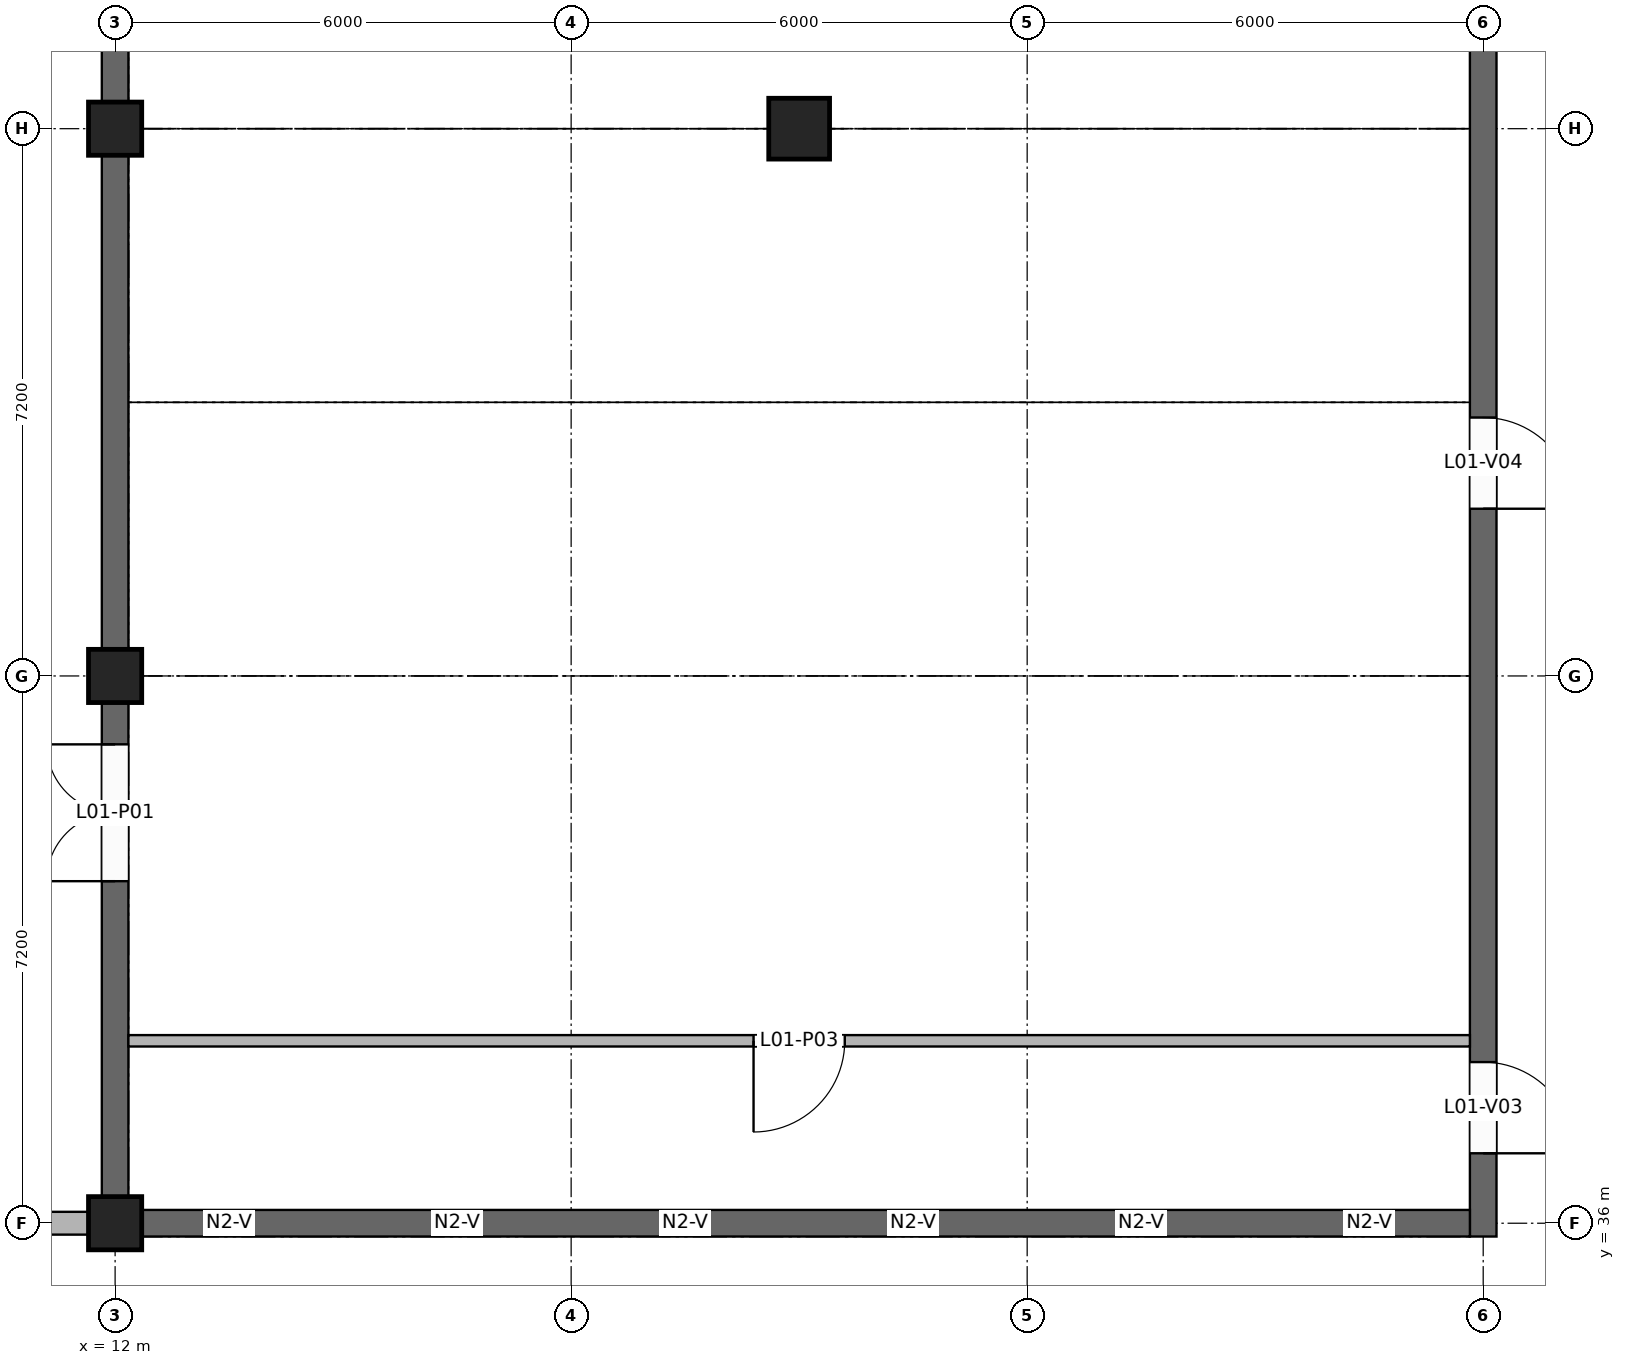
"""IFC4 building model, lengths in metres.
Left out: names, types, materials, properties, quantities, classifications, styles, units other than length and angle.
Written with IfcOpenShell. Run it as: python <this file> out.ifc"""

import sys

from ifc_helpers import new_model, si_unit, direction, frame, frame_2d, origin, origin_2d, place, context, subcontext, project, spatial, rectangle, extrude, element, fill, save


model = new_model("IFC4")
c1 = context("Model", 3, precision=1e-05, world=origin(), true_north=direction((0.0, 1.0)))
c2 = subcontext(c1, "Body", "Model", "MODEL_VIEW")
j1 = project(units=[si_unit("LENGTHUNIT", "METRE"), si_unit("PLANEANGLEUNIT", "RADIAN")], contexts=[c1])
p1 = place(None, origin())
s1 = spatial("IfcSite", under=j1, at=p1, CompositionType="ELEMENT")
p2 = place(p1, origin())
s2 = spatial("IfcBuilding", under=s1, at=p2, CompositionType="ELEMENT")
p3 = place(p2, frame((0.0, 0.0, 4.2)))
s3 = spatial("IfcBuildingStorey", under=s2, at=p3, CompositionType="ELEMENT", Elevation=4.2)
for number, where, z_axis, x_axis in (
    (1, (12.0, 36.0, 0.0), (0.0, 0.0, 1.0), (1.0, 0.0, 0.0)),
    (2, (12.0, 43.2, 0.0), (0.0, 0.0, 1.0), (1.0, 0.0, 0.0)),
    (3, (12.0, 50.4, 0.0), (0.0, 0.0, 1.0), (1.0, 0.0, 0.0)),
):
    element("IfcColumn", number, at=place(p3, frame(where, z_axis=z_axis, x_axis=x_axis)), inside=s3, PredefinedType="COLUMN", context=c2, shape_type="SweptSolid", body=[
        extrude(rectangle(XDim=0.7, YDim=0.7, at=origin_2d()), origin(), (0.0, 0.0, 1.0), 3.95),
    ])
p4 = place(p3, frame((30.0, 35.825, 0.0), z_axis=(0.0, 0.0, 1.0), x_axis=(0.0, 1.0, 0.0)))
e4 = element("IfcWall", 4, at=p4, inside=s3, PredefinedType="SHEAR", context=c2, shape_type="SweptSolid", body=[
    extrude(rectangle(XDim=21.55, YDim=0.35, at=frame_2d((10.775, 0.0))), origin(), (0.0, 0.0, 1.0), 4.2),
])
p5 = place(p4, frame((1.095, 0.0, 0.0)))
e5 = element("IfcOpeningElement", 5, at=p5, cuts=e4, PredefinedType="OPENING", context=c2, shape_type="SweptSolid", body=[
    extrude(rectangle(XDim=1.2, YDim=2.4, at=frame_2d((0.6, 1.2))), frame((0.0, 0.185, 0.0), z_axis=(0.0, -1.0, 0.0), x_axis=(1.0, 0.0, 0.0)), (0.0, 0.0, 1.0), 0.37),
])
p6 = place(p4, frame((9.575, 0.0, 0.0)))
e6 = element("IfcOpeningElement", 6, at=p6, cuts=e4, PredefinedType="OPENING", context=c2, shape_type="SweptSolid", body=[
    extrude(rectangle(XDim=1.2, YDim=2.4, at=frame_2d((0.6, 1.2))), frame((0.0, 0.185, 0.0), z_axis=(0.0, -1.0, 0.0), x_axis=(1.0, 0.0, 0.0)), (0.0, 0.0, 1.0), 0.37),
])
p7 = place(p4, frame((17.095, 0.0, 0.0)))
e7 = element("IfcOpeningElement", 7, at=p7, cuts=e4, PredefinedType="OPENING", context=c2, shape_type="SweptSolid", body=[
    extrude(rectangle(XDim=1.2, YDim=2.4, at=frame_2d((0.6, 1.2))), frame((0.0, 0.185, 0.0), z_axis=(0.0, -1.0, 0.0), x_axis=(1.0, 0.0, 0.0)), (0.0, 0.0, 1.0), 0.37),
])
p8 = place(p3, frame((12.0, 36.35, 0.0), z_axis=(0.0, 0.0, 1.0), x_axis=(0.0, 1.0, 0.0)))
e8 = element("IfcWall", 8, at=p8, inside=s3, PredefinedType="SHEAR", context=c2, shape_type="SweptSolid", body=[
    extrude(rectangle(XDim=6.5, YDim=0.35, at=frame_2d((3.25, 0.0))), origin(), (0.0, 0.0, 1.0), 3.05),
])
p9 = place(p8, frame((4.15, 0.0, 0.0)))
e9 = element("IfcOpeningElement", 9, at=p9, cuts=e8, PredefinedType="OPENING", context=c2, shape_type="SweptSolid", body=[
    extrude(rectangle(XDim=1.8, YDim=2.1, at=frame_2d((0.9, 1.05))), frame((0.0, 0.185, 0.0), z_axis=(0.0, -1.0, 0.0), x_axis=(1.0, 0.0, 0.0)), (0.0, 0.0, 1.0), 0.37),
])
p10 = place(p3, frame((12.0, 43.55, 0.0), z_axis=(0.0, 0.0, 1.0), x_axis=(0.0, 1.0, 0.0)))
e10 = element("IfcWall", 10, at=p10, inside=s3, PredefinedType="SHEAR", context=c2, shape_type="SweptSolid", body=[
    extrude(rectangle(XDim=6.5, YDim=0.35, at=frame_2d((3.25, 0.0))), origin(), (0.0, 0.0, 1.0), 3.05),
])
p11 = place(p3, frame((12.0, 50.75, 0.0), z_axis=(0.0, 0.0, 1.0), x_axis=(0.0, 1.0, 0.0)))
e11 = element("IfcWall", 11, at=p11, inside=s3, PredefinedType="SHEAR", context=c2, shape_type="SweptSolid", body=[
    extrude(rectangle(XDim=6.625, YDim=0.35, at=frame_2d((3.312, 0.0))), origin(), (0.0, 0.0, 1.0), 3.05),
])
p12 = place(p11, frame((2.15, 0.0, 0.0)))
e12 = element("IfcOpeningElement", 12, at=p12, cuts=e11, PredefinedType="OPENING", context=c2, shape_type="SweptSolid", body=[
    extrude(rectangle(XDim=1.2, YDim=2.1, at=frame_2d((0.6, 1.05))), frame((0.0, 0.185, 0.0), z_axis=(0.0, -1.0, 0.0), x_axis=(1.0, 0.0, 0.0)), (0.0, 0.0, 1.0), 0.37),
])
p13 = place(p3, frame((12.35, 36.0, 0.0), z_axis=(0.0, 0.0, 1.0), x_axis=(1.0, 0.0, 0.0)))
e13 = element("IfcWall", 13, at=p13, inside=s3, PredefinedType="SHEAR", context=c2, shape_type="SweptSolid", body=[
    extrude(rectangle(XDim=17.475, YDim=0.35, at=frame_2d((8.737, 0.0))), origin(), (0.0, 0.0, 1.0), 4.2),
])
p14 = place(p13, frame((0.85, 0.0, 1.2)))
e14 = element("IfcOpeningElement", 14, at=p14, cuts=e13, PredefinedType="OPENING", context=c2, shape_type="SweptSolid", body=[
    extrude(rectangle(XDim=0.6, YDim=2.4, at=frame_2d((0.3, 1.2))), frame((0.0, 0.185, 0.0), z_axis=(0.0, -1.0, 0.0), x_axis=(1.0, 0.0, 0.0)), (0.0, 0.0, 1.0), 0.37),
])
p15 = place(p13, frame((3.85, 0.0, 1.2)))
e15 = element("IfcOpeningElement", 15, at=p15, cuts=e13, PredefinedType="OPENING", context=c2, shape_type="SweptSolid", body=[
    extrude(rectangle(XDim=0.6, YDim=2.4, at=frame_2d((0.3, 1.2))), frame((0.0, 0.185, 0.0), z_axis=(0.0, -1.0, 0.0), x_axis=(1.0, 0.0, 0.0)), (0.0, 0.0, 1.0), 0.37),
])
p16 = place(p13, frame((6.85, 0.0, 1.2)))
e16 = element("IfcOpeningElement", 16, at=p16, cuts=e13, PredefinedType="OPENING", context=c2, shape_type="SweptSolid", body=[
    extrude(rectangle(XDim=0.6, YDim=2.4, at=frame_2d((0.3, 1.2))), frame((0.0, 0.185, 0.0), z_axis=(0.0, -1.0, 0.0), x_axis=(1.0, 0.0, 0.0)), (0.0, 0.0, 1.0), 0.37),
])
p17 = place(p13, frame((9.85, 0.0, 1.2)))
e17 = element("IfcOpeningElement", 17, at=p17, cuts=e13, PredefinedType="OPENING", context=c2, shape_type="SweptSolid", body=[
    extrude(rectangle(XDim=0.6, YDim=2.4, at=frame_2d((0.3, 1.2))), frame((0.0, 0.185, 0.0), z_axis=(0.0, -1.0, 0.0), x_axis=(1.0, 0.0, 0.0)), (0.0, 0.0, 1.0), 0.37),
])
p18 = place(p13, frame((12.85, 0.0, 1.2)))
e18 = element("IfcOpeningElement", 18, at=p18, cuts=e13, PredefinedType="OPENING", context=c2, shape_type="SweptSolid", body=[
    extrude(rectangle(XDim=0.6, YDim=2.4, at=frame_2d((0.3, 1.2))), frame((0.0, 0.185, 0.0), z_axis=(0.0, -1.0, 0.0), x_axis=(1.0, 0.0, 0.0)), (0.0, 0.0, 1.0), 0.37),
])
p19 = place(p13, frame((15.85, 0.0, 1.2)))
e19 = element("IfcOpeningElement", 19, at=p19, cuts=e13, PredefinedType="OPENING", context=c2, shape_type="SweptSolid", body=[
    extrude(rectangle(XDim=0.6, YDim=2.4, at=frame_2d((0.3, 1.2))), frame((0.0, 0.185, 0.0), z_axis=(0.0, -1.0, 0.0), x_axis=(1.0, 0.0, 0.0)), (0.0, 0.0, 1.0), 0.37),
])
p20 = place(p3, frame((21.0, 50.4, -0.2), z_axis=(0.0, 0.0, 1.0), x_axis=(1.0, 0.0, 0.0)))
e20 = element("IfcColumn", 20, at=p20, inside=s3, PredefinedType="COLUMN", context=c2, shape_type="SweptSolid", body=[
    extrude(rectangle(XDim=0.8, YDim=0.8, at=origin_2d()), origin(), (0.0, 0.0, 1.0), 4.4),
])
p21 = place(p3, frame((6.0, 36.0, 0.0), z_axis=(0.0, 0.0, 1.0), x_axis=(1.0, 0.0, 0.0)))
e21 = element("IfcWall", 21, at=p21, inside=s3, PredefinedType="SOLIDWALL", context=c2, shape_type="SweptSolid", body=[
    extrude(rectangle(XDim=5.65, YDim=0.3, at=frame_2d((2.825, 0.0))), origin(), (0.0, 0.0, 1.0), 3.15),
])
p22 = place(p21, frame((0.512, 0.0, 0.9)))
e22 = element("IfcOpeningElement", 22, at=p22, cuts=e21, PredefinedType="OPENING", context=c2, shape_type="SweptSolid", body=[
    extrude(rectangle(XDim=1.2, YDim=1.5, at=frame_2d((0.6, 0.75))), frame((0.0, 0.16, 0.0), z_axis=(0.0, -1.0, 0.0), x_axis=(1.0, 0.0, 0.0)), (0.0, 0.0, 1.0), 0.32),
])
p23 = place(p21, frame((2.225, 0.0, 0.9)))
e23 = element("IfcOpeningElement", 23, at=p23, cuts=e21, PredefinedType="OPENING", context=c2, shape_type="SweptSolid", body=[
    extrude(rectangle(XDim=1.2, YDim=1.5, at=frame_2d((0.6, 0.75))), frame((0.0, 0.16, 0.0), z_axis=(0.0, -1.0, 0.0), x_axis=(1.0, 0.0, 0.0)), (0.0, 0.0, 1.0), 0.32),
])
p24 = place(p21, frame((3.938, 0.0, 0.9)))
e24 = element("IfcOpeningElement", 24, at=p24, cuts=e21, PredefinedType="OPENING", context=c2, shape_type="SweptSolid", body=[
    extrude(rectangle(XDim=1.2, YDim=1.5, at=frame_2d((0.6, 0.75))), frame((0.0, 0.16, 0.0), z_axis=(0.0, -1.0, 0.0), x_axis=(1.0, 0.0, 0.0)), (0.0, 0.0, 1.0), 0.32),
])
p25 = place(p3, frame((12.175, 38.4, 0.0), z_axis=(0.0, 0.0, 1.0), x_axis=(1.0, 0.0, 0.0)))
e25 = element("IfcWall", 25, at=p25, inside=s3, PredefinedType="PARTITIONING", context=c2, shape_type="SweptSolid", body=[
    extrude(rectangle(XDim=17.65, YDim=0.15, at=frame_2d((8.825, 0.0))), origin(), (0.0, 0.0, 1.0), 3.05),
])
p26 = place(p25, frame((8.225, 0.0, 0.0)))
e26 = element("IfcOpeningElement", 26, at=p26, cuts=e25, PredefinedType="OPENING", context=c2, shape_type="SweptSolid", body=[
    extrude(rectangle(XDim=1.2, YDim=2.1, at=frame_2d((0.6, 1.05))), frame((0.0, 0.085, 0.0), z_axis=(0.0, -1.0, 0.0), x_axis=(1.0, 0.0, 0.0)), (0.0, 0.0, 1.0), 0.17),
])
p27 = place(p5, frame((1.2, 0.0, 0.0), z_axis=(0.0, 0.0, 1.0), x_axis=(-1.0, 0.0, 0.0)))
e27 = element("IfcDoor", 27, at=p27, inside=s3, OperationType="SINGLE_SWING_RIGHT", PredefinedType="DOOR", context=c2, shape_type="SweptSolid", body=[
    extrude(rectangle(XDim=1.2, YDim=2.4, at=frame_2d((0.6, 1.2))), frame((0.0, 0.025, 0.0), z_axis=(0.0, -1.0, 0.0), x_axis=(1.0, 0.0, 0.0)), (0.0, 0.0, 1.0), 0.05),
])
fill(e5, e27)
p28 = place(p6, frame((1.2, 0.0, 0.0), z_axis=(0.0, 0.0, 1.0), x_axis=(-1.0, 0.0, 0.0)))
e28 = element("IfcDoor", 28, at=p28, inside=s3, OperationType="SINGLE_SWING_RIGHT", PredefinedType="DOOR", context=c2, shape_type="SweptSolid", body=[
    extrude(rectangle(XDim=1.2, YDim=2.4, at=frame_2d((0.6, 1.2))), frame((0.0, 0.025, 0.0), z_axis=(0.0, -1.0, 0.0), x_axis=(1.0, 0.0, 0.0)), (0.0, 0.0, 1.0), 0.05),
])
fill(e6, e28)
p29 = place(p14, origin())
e29 = element("IfcWindow", 29, at=p29, inside=s3, PartitioningType="SINGLE_PANEL", PredefinedType="WINDOW", context=c2, shape_type="SweptSolid", body=[
    extrude(rectangle(XDim=0.6, YDim=2.4, at=frame_2d((0.3, 1.2))), frame((0.0, 0.03, 0.0), z_axis=(0.0, -1.0, 0.0), x_axis=(1.0, 0.0, 0.0)), (0.0, 0.0, 1.0), 0.06),
])
fill(e14, e29)
p30 = place(p15, origin())
e30 = element("IfcWindow", 30, at=p30, inside=s3, PartitioningType="SINGLE_PANEL", PredefinedType="WINDOW", context=c2, shape_type="SweptSolid", body=[
    extrude(rectangle(XDim=0.6, YDim=2.4, at=frame_2d((0.3, 1.2))), frame((0.0, 0.03, 0.0), z_axis=(0.0, -1.0, 0.0), x_axis=(1.0, 0.0, 0.0)), (0.0, 0.0, 1.0), 0.06),
])
fill(e15, e30)
p31 = place(p16, origin())
e31 = element("IfcWindow", 31, at=p31, inside=s3, PartitioningType="SINGLE_PANEL", PredefinedType="WINDOW", context=c2, shape_type="SweptSolid", body=[
    extrude(rectangle(XDim=0.6, YDim=2.4, at=frame_2d((0.3, 1.2))), frame((0.0, 0.03, 0.0), z_axis=(0.0, -1.0, 0.0), x_axis=(1.0, 0.0, 0.0)), (0.0, 0.0, 1.0), 0.06),
])
fill(e16, e31)
p32 = place(p17, origin())
e32 = element("IfcWindow", 32, at=p32, inside=s3, PartitioningType="SINGLE_PANEL", PredefinedType="WINDOW", context=c2, shape_type="SweptSolid", body=[
    extrude(rectangle(XDim=0.6, YDim=2.4, at=frame_2d((0.3, 1.2))), frame((0.0, 0.03, 0.0), z_axis=(0.0, -1.0, 0.0), x_axis=(1.0, 0.0, 0.0)), (0.0, 0.0, 1.0), 0.06),
])
fill(e17, e32)
p33 = place(p18, origin())
e33 = element("IfcWindow", 33, at=p33, inside=s3, PartitioningType="SINGLE_PANEL", PredefinedType="WINDOW", context=c2, shape_type="SweptSolid", body=[
    extrude(rectangle(XDim=0.6, YDim=2.4, at=frame_2d((0.3, 1.2))), frame((0.0, 0.03, 0.0), z_axis=(0.0, -1.0, 0.0), x_axis=(1.0, 0.0, 0.0)), (0.0, 0.0, 1.0), 0.06),
])
fill(e18, e33)
p34 = place(p19, origin())
e34 = element("IfcWindow", 34, at=p34, inside=s3, PartitioningType="SINGLE_PANEL", PredefinedType="WINDOW", context=c2, shape_type="SweptSolid", body=[
    extrude(rectangle(XDim=0.6, YDim=2.4, at=frame_2d((0.3, 1.2))), frame((0.0, 0.03, 0.0), z_axis=(0.0, -1.0, 0.0), x_axis=(1.0, 0.0, 0.0)), (0.0, 0.0, 1.0), 0.06),
])
fill(e19, e34)
p35 = place(p9, origin())
e35 = element("IfcDoor", 35, at=p35, inside=s3, OperationType="DOUBLE_DOOR_SINGLE_SWING", PredefinedType="DOOR", context=c2, shape_type="SweptSolid", body=[
    extrude(rectangle(XDim=1.8, YDim=2.1, at=frame_2d((0.9, 1.05))), frame((0.0, 0.025, 0.0), z_axis=(0.0, -1.0, 0.0), x_axis=(1.0, 0.0, 0.0)), (0.0, 0.0, 1.0), 0.05),
])
fill(e9, e35)
p36 = place(p26, frame((1.2, 0.0, 0.0), z_axis=(0.0, 0.0, 1.0), x_axis=(-1.0, 0.0, 0.0)))
e36 = element("IfcDoor", 36, at=p36, inside=s3, OperationType="SINGLE_SWING_RIGHT", PredefinedType="DOOR", context=c2, shape_type="SweptSolid", body=[
    extrude(rectangle(XDim=1.2, YDim=2.1, at=frame_2d((0.6, 1.05))), frame((0.0, 0.025, 0.0), z_axis=(0.0, -1.0, 0.0), x_axis=(1.0, 0.0, 0.0)), (0.0, 0.0, 1.0), 0.05),
])
fill(e26, e36)
save(model, sys.argv[1])
